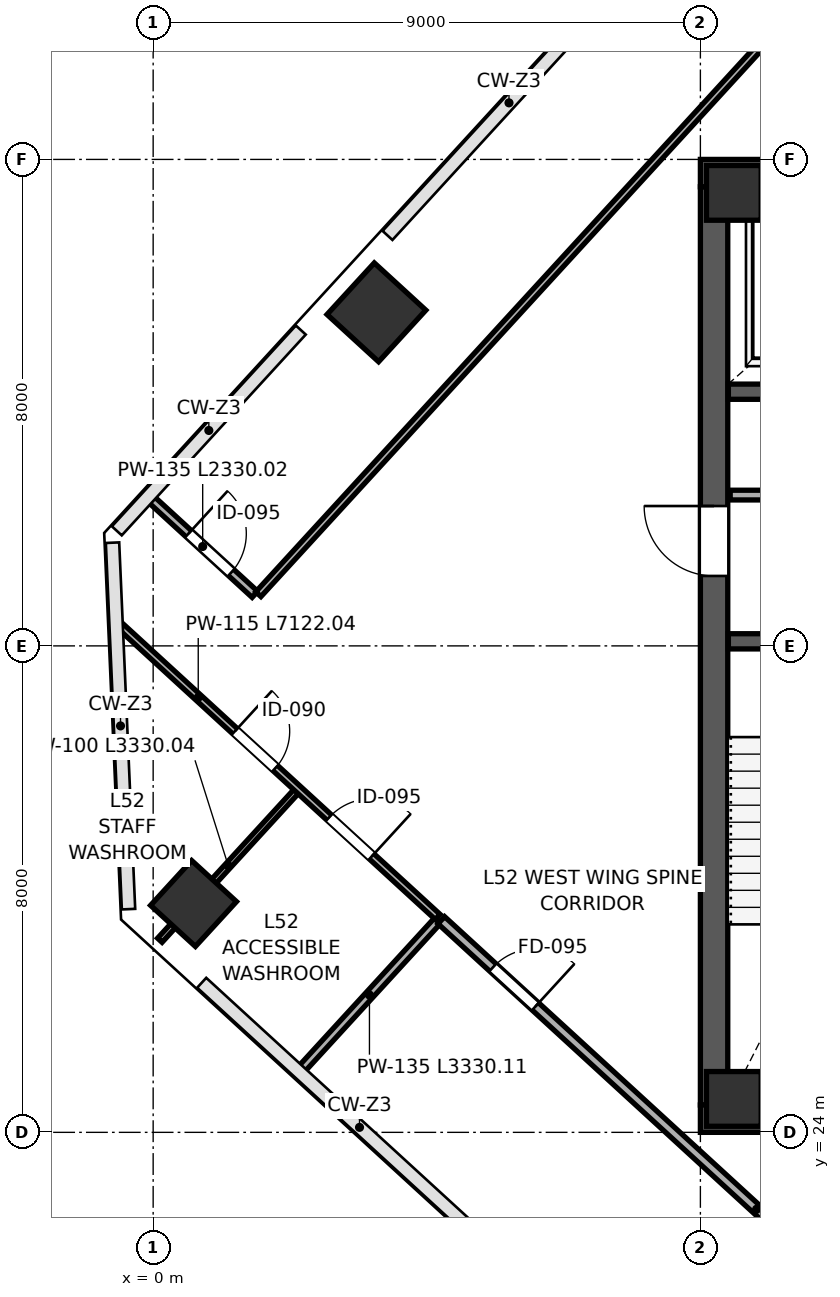
"""IFC4 building model, lengths in metres.
Left out: names, types, materials, properties, quantities, classifications, styles, units other than length and angle.
Written with IfcOpenShell. Run it as: python <this file> out.ifc"""

import sys

from ifc_helpers import new_model, si_unit, direction, frame, frame_2d, origin, origin_2d, place, context, subcontext, project, spatial, rectangle, extrude, source, transform, mapped, element, fill, save


model = new_model("IFC4")
c1 = context("Model", 3, precision=1e-05, world=origin(), true_north=direction((0.0, 1.0)))
c2 = subcontext(c1, "Body", "Model", "MODEL_VIEW")
j1 = project(units=[si_unit("LENGTHUNIT", "METRE"), si_unit("PLANEANGLEUNIT", "RADIAN")], contexts=[c1])
p1 = place(None, origin())
s1 = spatial("IfcSite", under=j1, at=p1, CompositionType="ELEMENT")
p2 = place(p1, origin())
s2 = spatial("IfcBuilding", under=s1, at=p2, CompositionType="ELEMENT")
p3 = place(p2, frame((0.0, 0.0, 233.2)))
s3 = spatial("IfcBuildingStorey", under=s2, at=p3, CompositionType="ELEMENT", Elevation=233.2)
m1 = source(origin(), c2, "Body", "SweptSolid", [
    extrude(rectangle(XDim=0.9, YDim=0.9, at=origin_2d()), origin(), (0.0, 0.0, 1.0), 4.198),
])
for number, where, z_axis, x_axis in (
    (1, (9.55, 24.55, 0.001), (0.0, 0.0, 1.0), (1.0, 0.0, 0.0)),
    (2, (9.55, 39.45, 0.001), (0.0, 0.0, 1.0), (1.0, 0.0, 0.0)),
):
    element("IfcColumn", number, at=place(p3, frame(where, z_axis=z_axis, x_axis=x_axis)), inside=s3, PredefinedType="COLUMN", context=c2, shape_type="MappedRepresentation", body=[
        mapped(m1, transform((0.0, 0.0, 0.0), scale=1.0)),
    ])
m2 = source(origin(), c2, "Body", "SweptSolid", [
    extrude(rectangle(XDim=1.0, YDim=1.0, at=origin_2d()), origin(), (0.0, 0.0, 1.0), 4.198),
])
p4 = place(p3, frame((0.664, 27.764, 0.001), z_axis=(0.0, 0.0, 1.0), x_axis=(-0.73727733681, 0.675590207616, 0.0)))
e3 = element("IfcColumn", 3, at=p4, inside=s3, PredefinedType="COLUMN", context=c2, shape_type="MappedRepresentation", body=[
    mapped(m2, transform((0.0, 0.0, 0.0), scale=1.0)),
])
m3 = source(origin(), c2, "Body", "SweptSolid", [
    extrude(rectangle(XDim=1.15, YDim=1.15, at=origin_2d()), origin(), (0.0, 0.0, 1.0), 4.198),
])
p5 = place(p3, frame((3.672, 37.486, 0.001), z_axis=(0.0, 0.0, 1.0), x_axis=(-0.73727733681, 0.675590207616, 0.0)))
e4 = element("IfcColumn", 4, at=p5, inside=s3, PredefinedType="COLUMN", context=c2, shape_type="MappedRepresentation", body=[
    mapped(m3, transform((0.0, 0.0, 0.0), scale=1.0)),
])
p6 = place(p3, frame((9.225, 24.45, 0.0), z_axis=(0.0, 0.0, 1.0), x_axis=(0.0, 1.0, 0.0)))
e5 = element("IfcWall", 5, at=p6, inside=s3, PredefinedType="SHEAR", context=c2, shape_type="SweptSolid", body=[
    extrude(rectangle(XDim=15.1, YDim=0.45, at=frame_2d((7.55, 0.0))), origin(), (0.0, 0.0, 1.0), 3.96),
])
p7 = place(p6, frame((8.7, 0.0, 0.0)))
e6 = element("IfcOpeningElement", 6, at=p7, cuts=e5, PredefinedType="OPENING", context=c2, shape_type="SweptSolid", body=[
    extrude(rectangle(XDim=1.15, YDim=2.2, at=frame_2d((0.575, 1.1))), frame((0.0, 0.235, 0.0), z_axis=(0.0, -1.0, 0.0), x_axis=(1.0, 0.0, 0.0)), (0.0, 0.0, 1.0), 0.47),
])
for number, where, z_axis, x_axis in (
    (7, (9.0, 24.225, 0.0), (0.0, 0.0, 1.0), (1.0, 0.0, 0.0)),
    (8, (9.0, 39.775, 0.0), (0.0, 0.0, 1.0), (1.0, 0.0, 0.0)),
):
    element("IfcWall", number, at=place(p3, frame(where, z_axis=z_axis, x_axis=x_axis)), inside=s3, PredefinedType="SHEAR", context=c2, shape_type="SweptSolid", body=[
        extrude(rectangle(XDim=18.0, YDim=0.45, at=frame_2d((9.0, 0.0))), origin(), (0.0, 0.0, 1.0), 3.96),
    ])
p8 = place(p3, frame((9.46, 32.075, 0.0), z_axis=(0.0, 0.0, 1.0), x_axis=(1.0, 0.0, 0.0)))
e9 = element("IfcWall", 9, at=p8, inside=s3, PredefinedType="SHEAR", context=c2, shape_type="SweptSolid", body=[
    extrude(rectangle(XDim=3.29, YDim=0.25, at=frame_2d((1.645, 0.0))), origin(), (0.0, 0.0, 1.0), 3.96),
])
p9 = place(p3, frame((9.46, 36.18, 0.0), z_axis=(0.0, 0.0, 1.0), x_axis=(1.0, 0.0, 0.0)))
e10 = element("IfcWall", 10, at=p9, inside=s3, PredefinedType="SHEAR", context=c2, shape_type="SweptSolid", body=[
    extrude(rectangle(XDim=3.79, YDim=0.25, at=frame_2d((1.895, 0.0))), origin(), (0.0, 0.0, 1.0), 3.96),
])
p10 = place(p9, frame((2.62, 0.0, 0.0)))
e11 = element("IfcOpeningElement", 11, at=p10, cuts=e10, PredefinedType="OPENING", context=c2, shape_type="SweptSolid", body=[
    extrude(rectangle(XDim=0.85, YDim=2.1, at=frame_2d((0.425, 1.05))), frame((0.0, 0.135, 0.0), z_axis=(0.0, -1.0, 0.0), x_axis=(1.0, 0.0, 0.0)), (0.0, 0.0, 1.0), 0.27),
])
p11 = place(p9, frame((0.85, 0.0, 0.0)))
e12 = element("IfcOpeningElement", 12, at=p11, cuts=e10, PredefinedType="OPENING", context=c2, shape_type="SweptSolid", body=[
    extrude(rectangle(XDim=1.3, YDim=2.25, at=frame_2d((0.65, 1.125))), frame((0.0, 0.135, 0.0), z_axis=(0.0, -1.0, 0.0), x_axis=(1.0, 0.0, 0.0)), (0.0, 0.0, 1.0), 0.27),
])
p12 = place(p3, frame((9.49, 34.48, 0.0), z_axis=(0.0, 0.0, 1.0), x_axis=(1.0, 0.0, 0.0)))
e13 = element("IfcWall", 13, at=p12, inside=s3, PredefinedType="PARTITIONING", context=c2, shape_type="SweptSolid", body=[
    extrude(rectangle(XDim=3.7, YDim=0.16, at=frame_2d((1.85, 0.0))), origin(), (0.0, 0.0, 1.0), 3.96),
])
p13 = place(p12, frame((1.15, 0.0, 0.0)))
e14 = element("IfcOpeningElement", 14, at=p13, cuts=e13, PredefinedType="OPENING", context=c2, shape_type="SweptSolid", body=[
    extrude(rectangle(XDim=0.9, YDim=2.15, at=frame_2d((0.45, 1.075))), frame((0.0, 0.09, 0.0), z_axis=(0.0, -1.0, 0.0), x_axis=(1.0, 0.0, 0.0)), (0.0, 0.0, 1.0), 0.18),
])
p14 = place(p3, frame((0.11, 27.159, 0.0), z_axis=(0.0, 0.0, 1.0), x_axis=(0.675605101048, 0.737263689217, 0.0)))
e15 = element("IfcWall", 15, at=p14, inside=s3, PredefinedType="PARTITIONING", context=c2, shape_type="SweptSolid", body=[
    extrude(rectangle(XDim=3.33, YDim=0.1, at=frame_2d((1.665, 0.0))), origin(), (0.0, 0.0, 1.0), 3.195),
])
p15 = place(p3, frame((2.432, 25.031, 0.0), z_axis=(0.0, 0.0, 1.0), x_axis=(0.675605101048, 0.737263689217, 0.0)))
e16 = element("IfcWall", 16, at=p15, inside=s3, PredefinedType="PARTITIONING", context=c2, shape_type="SweptSolid", body=[
    extrude(rectangle(XDim=3.33, YDim=0.135, at=frame_2d((1.665, 0.0))), origin(), (0.0, 0.0, 1.0), 3.195),
])
p16 = place(p3, frame((-0.571, 32.354, 0.0), z_axis=(0.0, 0.0, 1.0), x_axis=(0.737285035525, -0.675581805846, 0.0)))
e17 = element("IfcWall", 17, at=p16, inside=s3, PredefinedType="PARTITIONING", context=c2, shape_type="SweptSolid", body=[
    extrude(rectangle(XDim=7.122, YDim=0.115, at=frame_2d((3.561, 0.0))), origin(), (0.0, 0.0, 1.0), 3.96),
])
p17 = place(p16, frame((2.6, 0.0, 0.0)))
e18 = element("IfcOpeningElement", 18, at=p17, cuts=e17, PredefinedType="OPENING", context=c2, shape_type="SweptSolid", body=[
    extrude(rectangle(XDim=0.9, YDim=2.15, at=frame_2d((0.45, 1.075))), frame((0.0, 0.067, 0.0), z_axis=(0.0, -1.0, 0.0), x_axis=(1.0, 0.0, 0.0)), (0.0, 0.0, 1.0), 0.135),
])
p18 = place(p16, frame((4.7, 0.0, 0.0)))
e19 = element("IfcOpeningElement", 19, at=p18, cuts=e17, PredefinedType="OPENING", context=c2, shape_type="SweptSolid", body=[
    extrude(rectangle(XDim=0.95, YDim=2.15, at=frame_2d((0.475, 1.075))), frame((0.0, 0.067, 0.0), z_axis=(0.0, -1.0, 0.0), x_axis=(1.0, 0.0, 0.0)), (0.0, 0.0, 1.0), 0.135),
])
p19 = place(p3, frame((4.739, 27.489, 0.0), z_axis=(0.0, 0.0, 1.0), x_axis=(0.737276572642, -0.675591041558, 0.0)))
e20 = element("IfcWall", 20, at=p19, inside=s3, PredefinedType="PARTITIONING", context=c2, shape_type="SweptSolid", body=[
    extrude(rectangle(XDim=14.07, YDim=0.16, at=frame_2d((7.035, 0.0))), origin(), (0.0, 0.0, 1.0), 3.96),
])
p20 = place(p19, frame((1.15, 0.0, 0.0)))
e21 = element("IfcOpeningElement", 21, at=p20, cuts=e20, PredefinedType="OPENING", context=c2, shape_type="SweptSolid", body=[
    extrude(rectangle(XDim=0.95, YDim=2.15, at=frame_2d((0.475, 1.075))), frame((0.0, 0.09, 0.0), z_axis=(0.0, -1.0, 0.0), x_axis=(1.0, 0.0, 0.0)), (0.0, 0.0, 1.0), 0.18),
])
p21 = place(p3, frame((-0.044, 34.421, 0.0), z_axis=(0.0, 0.0, 1.0), x_axis=(0.73728894688, -0.675577537229, 0.0)))
e22 = element("IfcWall", 22, at=p21, inside=s3, PredefinedType="PARTITIONING", context=c2, shape_type="SweptSolid", body=[
    extrude(rectangle(XDim=2.33, YDim=0.135, at=frame_2d((1.165, 0.0))), origin(), (0.0, 0.0, 1.0), 3.96),
])
p22 = place(p21, frame((0.85, 0.0, 0.0)))
e23 = element("IfcOpeningElement", 23, at=p22, cuts=e22, PredefinedType="OPENING", context=c2, shape_type="SweptSolid", body=[
    extrude(rectangle(XDim=0.95, YDim=2.15, at=frame_2d((0.475, 1.075))), frame((0.0, 0.078, 0.0), z_axis=(0.0, -1.0, 0.0), x_axis=(1.0, 0.0, 0.0)), (0.0, 0.0, 1.0), 0.155),
])
p23 = place(p3, frame((1.73, 32.85, 0.0), z_axis=(0.0, 0.0, 1.0), x_axis=(0.675589845589, 0.737277668546, 0.0)))
e24 = element("IfcWall", 24, at=p23, inside=s3, PredefinedType="PARTITIONING", context=c2, shape_type="SweptSolid", body=[
    extrude(rectangle(XDim=26.742, YDim=0.115, at=frame_2d((13.371, 0.0))), origin(), (0.0, 0.0, 1.0), 3.96),
])
m4 = source(origin(), c2, "Body", "SweptSolid", [
    extrude(rectangle(XDim=1.15, YDim=2.2, at=frame_2d((0.575, 1.1))), frame((0.0, 0.025, 0.0), z_axis=(0.0, -1.0, 0.0), x_axis=(1.0, 0.0, 0.0)), (0.0, 0.0, 1.0), 0.05),
])
p24 = place(p7, origin())
e25 = element("IfcDoor", 25, at=p24, inside=s3, OperationType="SINGLE_SWING_RIGHT", PredefinedType="DOOR", context=c2, shape_type="MappedRepresentation", body=[
    mapped(m4, transform((0.0, 0.0, 0.0), scale=1.0)),
])
fill(e6, e25)
m5 = source(origin(), c2, "Body", "SweptSolid", [
    extrude(rectangle(XDim=0.9, YDim=2.15, at=frame_2d((0.45, 1.075))), frame((0.0, 0.025, 0.0), z_axis=(0.0, -1.0, 0.0), x_axis=(1.0, 0.0, 0.0)), (0.0, 0.0, 1.0), 0.05),
])
p25 = place(p17, origin())
e26 = element("IfcDoor", 26, at=p25, inside=s3, OperationType="SINGLE_SWING_LEFT", PredefinedType="DOOR", context=c2, shape_type="MappedRepresentation", body=[
    mapped(m5, transform((0.0, 0.0, 0.0), scale=1.0)),
])
fill(e18, e26)
m6 = source(origin(), c2, "Body", "SweptSolid", [
    extrude(rectangle(XDim=0.95, YDim=2.15, at=frame_2d((0.475, 1.075))), frame((0.0, 0.025, 0.0), z_axis=(0.0, -1.0, 0.0), x_axis=(1.0, 0.0, 0.0)), (0.0, 0.0, 1.0), 0.05),
])
p26 = place(p18, origin())
e27 = element("IfcDoor", 27, at=p26, inside=s3, OperationType="SINGLE_SWING_RIGHT", PredefinedType="DOOR", context=c2, shape_type="MappedRepresentation", body=[
    mapped(m6, transform((0.0, 0.0, 0.0), scale=1.0)),
])
fill(e19, e27)
m7 = source(origin(), c2, "Body", "SweptSolid", [
    extrude(rectangle(XDim=0.95, YDim=2.15, at=frame_2d((0.475, 1.075))), frame((0.0, 0.025, 0.0), z_axis=(0.0, -1.0, 0.0), x_axis=(1.0, 0.0, 0.0)), (0.0, 0.0, 1.0), 0.05),
])
p27 = place(p20, origin())
e28 = element("IfcDoor", 28, at=p27, inside=s3, OperationType="SINGLE_SWING_RIGHT", PredefinedType="DOOR", context=c2, shape_type="MappedRepresentation", body=[
    mapped(m7, transform((0.0, 0.0, 0.0), scale=1.0)),
])
fill(e21, e28)
p28 = place(p22, origin())
e29 = element("IfcDoor", 29, at=p28, inside=s3, OperationType="SINGLE_SWING_LEFT", PredefinedType="DOOR", context=c2, shape_type="MappedRepresentation", body=[
    mapped(m6, transform((0.0, 0.0, 0.0), scale=1.0)),
])
fill(e23, e29)
save(model, sys.argv[1])
